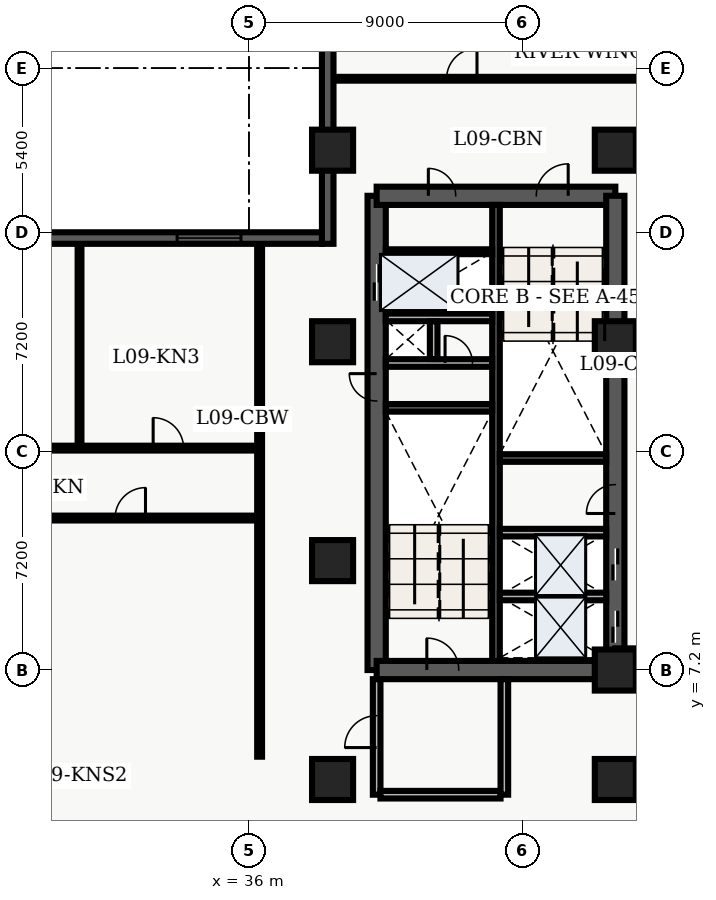
"""IFC4 building model, lengths in metres.
Left out: names, types, materials, properties, quantities, classifications, styles, units other than length and angle.
Written with IfcOpenShell. Run it as: python <this file> out.ifc"""

import sys

from ifc_helpers import new_model, entity, si_unit, converted_unit, direction, frame, origin_with_axes, origin_2d_with_axis, place, context, subcontext, project, spatial, polyline, rectangle, outline, extrude, element, fill, save


model = new_model("IFC4")
c1 = context("Model", 3, precision=1e-05, world=origin_with_axes(), true_north=direction((0.0, 1.0)))
c2 = subcontext(c1, "Body", "Model", "MODEL_VIEW")
j1 = project(units=[si_unit("LENGTHUNIT", "METRE"), converted_unit("PLANEANGLEUNIT", "DEGREE", entity("IfcPlaneAngleMeasure", 0.017), si_unit("PLANEANGLEUNIT", "RADIAN"), dimensions=[0, 0, 0, 0, 0, 0, 0])], contexts=[c1])
p1 = place(None, origin_with_axes())
s1 = spatial("IfcSite", under=j1, at=p1, CompositionType="ELEMENT")
p2 = place(p1, origin_with_axes())
s2 = spatial("IfcBuilding", under=s1, at=p2, CompositionType="ELEMENT")
p3 = place(p2, frame((0.0, 0.0, 40.5), z_axis=(0.0, 0.0, 1.0), x_axis=(1.0, 0.0, 0.0)))
s3 = spatial("IfcBuildingStorey", under=s2, at=p3, CompositionType="ELEMENT", Elevation=40.5)
p4 = place(p3, frame((40.2, 7.2, 0.0), z_axis=(0.0, 0.0, 1.0), x_axis=(0.0, 1.0, 0.0)))
e1 = element("IfcWall", 1, at=p4, inside=s3, PredefinedType="SHEAR", context=c2, shape_type="SweptSolid", body=[
    extrude(outline(polyline([(0.0, -0.3), (15.6, -0.3), (15.6, 0.3), (0.0, 0.3), (0.0, -0.3)])), origin_with_axes(), (0.0, 0.0, 1.0), 3.66),
])
p5 = place(p4, frame((12.75, 0.0, 0.0), z_axis=(0.0, 0.0, 1.0), x_axis=(1.0, 0.0, 0.0)))
e2 = element("IfcOpeningElement", 2, at=p5, cuts=e1, PredefinedType="OPENING", context=c2, shape_type="SweptSolid", body=[
    extrude(rectangle(XDim=1.2, YDim=0.62, at=origin_2d_with_axis()), origin_with_axes(), (0.0, 0.0, 1.0), 2.15),
])
p6 = place(p4, frame((9.3, 0.0, 0.0), z_axis=(0.0, 0.0, 1.0), x_axis=(1.0, 0.0, 0.0)))
e3 = element("IfcOpeningElement", 3, at=p6, cuts=e1, PredefinedType="OPENING", context=c2, shape_type="SweptSolid", body=[
    extrude(rectangle(XDim=0.9, YDim=0.62, at=origin_2d_with_axis()), origin_with_axes(), (0.0, 0.0, 1.0), 2.15),
])
p7 = place(p3, frame((40.2, 7.2, 0.0), z_axis=(0.0, 0.0, 1.0), x_axis=(1.0, 0.0, 0.0)))
e4 = element("IfcWall", 4, at=p7, inside=s3, PredefinedType="SHEAR", context=c2, shape_type="SweptSolid", body=[
    extrude(outline(polyline([(0.0, -0.3), (7.85, -0.3), (7.85, 0.3), (0.0, 0.3), (0.0, -0.3)])), origin_with_axes(), (0.0, 0.0, 1.0), 3.66),
])
p8 = place(p7, frame((2.175, 0.0, 0.0), z_axis=(0.0, 0.0, 1.0), x_axis=(1.0, 0.0, 0.0)))
e5 = element("IfcOpeningElement", 5, at=p8, cuts=e4, PredefinedType="OPENING", context=c2, shape_type="SweptSolid", body=[
    extrude(rectangle(XDim=1.05, YDim=0.62, at=origin_2d_with_axis()), origin_with_axes(), (0.0, 0.0, 1.0), 2.15),
])
p9 = place(p3, frame((40.2, 22.8, 0.0), z_axis=(0.0, 0.0, 1.0), x_axis=(1.0, 0.0, 0.0)))
e6 = element("IfcWall", 6, at=p9, inside=s3, PredefinedType="SHEAR", context=c2, shape_type="SweptSolid", body=[
    extrude(outline(polyline([(0.0, -0.3), (7.85, -0.3), (7.85, 0.3), (0.0, 0.3), (0.0, -0.3)])), origin_with_axes(), (0.0, 0.0, 1.0), 3.66),
])
p10 = place(p9, frame((5.775, 0.0, 0.0), z_axis=(0.0, 0.0, 1.0), x_axis=(1.0, 0.0, 0.0)))
e7 = element("IfcOpeningElement", 7, at=p10, cuts=e6, PredefinedType="OPENING", context=c2, shape_type="SweptSolid", body=[
    extrude(rectangle(XDim=1.05, YDim=0.62, at=origin_2d_with_axis()), origin_with_axes(), (0.0, 0.0, 1.0), 2.15),
])
p11 = place(p9, frame((2.15, 0.0, 0.0), z_axis=(0.0, 0.0, 1.0), x_axis=(1.0, 0.0, 0.0)))
e8 = element("IfcOpeningElement", 8, at=p11, cuts=e6, PredefinedType="OPENING", context=c2, shape_type="SweptSolid", body=[
    extrude(rectangle(XDim=0.9, YDim=0.62, at=origin_2d_with_axis()), origin_with_axes(), (0.0, 0.0, 1.0), 2.15),
])
p12 = place(p3, frame((48.05, 7.2, 0.0), z_axis=(0.0, 0.0, 1.0), x_axis=(0.0, 1.0, 0.0)))
e9 = element("IfcWall", 9, at=p12, inside=s3, PredefinedType="SHEAR", context=c2, shape_type="SweptSolid", body=[
    extrude(outline(polyline([(0.0, -0.3), (15.6, -0.3), (15.6, 0.3), (0.0, 0.3), (0.0, -0.3)])), origin_with_axes(), (0.0, 0.0, 1.0), 3.66),
])
p13 = place(p12, frame((1.425, 0.0, 0.0), z_axis=(0.0, 0.0, 1.0), x_axis=(1.0, 0.0, 0.0)))
e10 = element("IfcOpeningElement", 10, at=p13, cuts=e9, PredefinedType="OPENING", context=c2, shape_type="SweptSolid", body=[
    extrude(rectangle(XDim=1.05, YDim=0.62, at=origin_2d_with_axis()), origin_with_axes(), (0.0, 0.0, 1.0), 2.15),
])
p14 = place(p12, frame((3.475, 0.0, 0.0), z_axis=(0.0, 0.0, 1.0), x_axis=(1.0, 0.0, 0.0)))
e11 = element("IfcOpeningElement", 11, at=p14, cuts=e9, PredefinedType="OPENING", context=c2, shape_type="SweptSolid", body=[
    extrude(rectangle(XDim=1.05, YDim=0.62, at=origin_2d_with_axis()), origin_with_axes(), (0.0, 0.0, 1.0), 2.15),
])
p15 = place(p12, frame((5.625, 0.0, 0.0), z_axis=(0.0, 0.0, 1.0), x_axis=(1.0, 0.0, 0.0)))
e12 = element("IfcOpeningElement", 12, at=p15, cuts=e9, PredefinedType="OPENING", context=c2, shape_type="SweptSolid", body=[
    extrude(rectangle(XDim=0.95, YDim=0.62, at=origin_2d_with_axis()), origin_with_axes(), (0.0, 0.0, 1.0), 2.15),
])
p16 = place(p3, frame((44.125, 7.5, 0.0), z_axis=(0.0, 0.0, 1.0), x_axis=(0.0, 1.0, 0.0)))
e13 = element("IfcWall", 13, at=p16, inside=s3, PredefinedType="SHEAR", context=c2, shape_type="SweptSolid", body=[
    extrude(outline(polyline([(0.0, -0.125), (15.0, -0.125), (15.0, 0.125), (0.0, 0.125), (0.0, -0.125)])), origin_with_axes(), (0.0, 0.0, 1.0), 3.66),
])
for number, where, z_axis, x_axis in (
    (14, (40.5, 15.825, 0.0), (0.0, 0.0, 1.0), (1.0, 0.0, 0.0)),
    (15, (44.25, 14.175, 0.0), (0.0, 0.0, 1.0), (1.0, 0.0, 0.0)),
):
    element("IfcWall", number, at=place(p3, frame(where, z_axis=z_axis, x_axis=x_axis)), inside=s3, PredefinedType="SHEAR", context=c2, shape_type="SweptSolid", body=[
        extrude(outline(polyline([(0.0, -0.125), (3.5, -0.125), (3.5, 0.125), (0.0, 0.125), (0.0, -0.125)])), origin_with_axes(), (0.0, 0.0, 1.0), 3.66),
    ])
p17 = place(p3, frame((40.5, 17.3, 0.0), z_axis=(0.0, 0.0, 1.0), x_axis=(1.0, 0.0, 0.0)))
e16 = element("IfcWall", 16, at=p17, inside=s3, PredefinedType="SOLIDWALL", context=c2, shape_type="SweptSolid", body=[
    extrude(outline(polyline([(0.0, -0.125), (3.5, -0.125), (3.5, 0.125), (0.0, 0.125), (0.0, -0.125)])), origin_with_axes(), (0.0, 0.0, 1.0), 2.7),
])
p18 = place(p17, frame((2.4, 0.0, 0.0), z_axis=(0.0, 0.0, 1.0), x_axis=(1.0, 0.0, 0.0)))
e17 = element("IfcOpeningElement", 17, at=p18, cuts=e16, PredefinedType="OPENING", context=c2, shape_type="SweptSolid", body=[
    extrude(rectangle(XDim=0.9, YDim=0.27, at=origin_2d_with_axis()), origin_with_axes(), (0.0, 0.0, 1.0), 2.15),
])
p19 = place(p3, frame((40.5, 18.8, 0.0), z_axis=(0.0, 0.0, 1.0), x_axis=(1.0, 0.0, 0.0)))
e18 = element("IfcWall", 18, at=p19, inside=s3, PredefinedType="SOLIDWALL", context=c2, shape_type="SweptSolid", body=[
    extrude(outline(polyline([(0.0, -0.125), (3.5, -0.125), (3.5, 0.125), (0.0, 0.125), (0.0, -0.125)])), origin_with_axes(), (0.0, 0.0, 1.0), 2.7),
])
p20 = place(p3, frame((42.075, 17.43, 0.0), z_axis=(0.0, 0.0, 1.0), x_axis=(0.0, 1.0, 0.0)))
e19 = element("IfcWall", 19, at=p20, inside=s3, PredefinedType="SOLIDWALL", context=c2, shape_type="SweptSolid", body=[
    extrude(outline(polyline([(0.0, -0.125), (1.24, -0.125), (1.24, 0.125), (0.0, 0.125), (0.0, -0.125)])), origin_with_axes(), (0.0, 0.0, 1.0), 2.7),
])
p21 = place(p3, frame((40.2, 3.1, 0.0), z_axis=(0.0, 0.0, 1.0), x_axis=(0.0, 1.0, 0.0)))
e20 = element("IfcWall", 20, at=p21, inside=s3, PredefinedType="SOLIDWALL", context=c2, shape_type="SweptSolid", body=[
    extrude(outline(polyline([(0.0, -0.125), (3.8, -0.125), (3.8, 0.125), (0.0, 0.125), (0.0, -0.125)])), origin_with_axes(), (0.0, 0.0, 1.0), 2.7),
])
p22 = place(p21, frame((2.075, 0.0, 0.0), z_axis=(0.0, 0.0, 1.0), x_axis=(1.0, 0.0, 0.0)))
e21 = element("IfcOpeningElement", 21, at=p22, cuts=e20, PredefinedType="OPENING", context=c2, shape_type="SweptSolid", body=[
    extrude(rectangle(XDim=1.05, YDim=0.27, at=origin_2d_with_axis()), origin_with_axes(), (0.0, 0.0, 1.0), 2.15),
])
p23 = place(p3, frame((40.325, 3.1, 0.0), z_axis=(0.0, 0.0, 1.0), x_axis=(1.0, 0.0, 0.0)))
e22 = element("IfcWall", 22, at=p23, inside=s3, PredefinedType="SOLIDWALL", context=c2, shape_type="SweptSolid", body=[
    extrude(outline(polyline([(0.0, -0.125), (3.95, -0.125), (3.95, 0.125), (0.0, 0.125), (0.0, -0.125)])), origin_with_axes(), (0.0, 0.0, 1.0), 2.7),
])
p24 = place(p3, frame((44.4, 3.1, 0.0), z_axis=(0.0, 0.0, 1.0), x_axis=(0.0, 1.0, 0.0)))
e23 = element("IfcWall", 23, at=p24, inside=s3, PredefinedType="SOLIDWALL", context=c2, shape_type="SweptSolid", body=[
    extrude(outline(polyline([(0.0, -0.125), (3.8, -0.125), (3.8, 0.125), (0.0, 0.125), (0.0, -0.125)])), origin_with_axes(), (0.0, 0.0, 1.0), 2.7),
])
for number, where, z_axis, x_axis in (
    (24, (38.75, 3.6, 0.0), (0.0, 0.0, 1.0), (1.0, 0.0, 0.0)),
    (25, (38.75, 10.8, 0.0), (0.0, 0.0, 1.0), (1.0, 0.0, 0.0)),
    (26, (38.75, 18.0, 0.0), (0.0, 0.0, 1.0), (1.0, 0.0, 0.0)),
    (27, (38.75, 24.3, 0.0), (0.0, 0.0, 1.0), (1.0, 0.0, 0.0)),
    (28, (48.05, 3.6, 0.0), (0.0, 0.0, 1.0), (1.0, 0.0, 0.0)),
    (29, (48.05, 7.2, 0.0), (0.0, 0.0, 1.0), (1.0, 0.0, 0.0)),
    (30, (48.05, 18.0, 0.0), (0.0, 0.0, 1.0), (1.0, 0.0, 0.0)),
    (31, (48.05, 24.3, 0.0), (0.0, 0.0, 1.0), (1.0, 0.0, 0.0)),
):
    element("IfcColumn", number, at=place(p3, frame(where, z_axis=z_axis, x_axis=x_axis)), inside=s3, PredefinedType="COLUMN", context=c2, shape_type="SweptSolid", body=[
        extrude(rectangle(XDim=1.35, YDim=1.35, at=origin_2d_with_axis()), origin_with_axes(), (0.0, 0.0, 1.0), 3.9),
    ])
p25 = place(p3, frame((40.5, 20.96, 0.0), z_axis=(0.0, 0.0, 1.0), x_axis=(1.0, 0.0, 0.0)))
e32 = element("IfcWall", 32, at=p25, inside=s3, PredefinedType="PARTITIONING", context=c2, shape_type="SweptSolid", body=[
    extrude(outline(polyline([(0.0, -0.08), (3.5, -0.08), (3.5, 0.08), (0.0, 0.08), (0.0, -0.08)])), origin_with_axes(), (0.0, 0.0, 1.0), 2.7),
])
for number, where, z_axis, x_axis in (
    (33, (44.25, 9.62, 0.0), (0.0, 0.0, 1.0), (1.0, 0.0, 0.0)),
    (34, (44.25, 11.72, 0.0), (0.0, 0.0, 1.0), (1.0, 0.0, 0.0)),
):
    element("IfcWall", number, at=place(p3, frame(where, z_axis=z_axis, x_axis=x_axis)), inside=s3, PredefinedType="SOLIDWALL", context=c2, shape_type="SweptSolid", body=[
        extrude(outline(polyline([(0.0, -0.125), (3.5, -0.125), (3.5, 0.125), (0.0, 0.125), (0.0, -0.125)])), origin_with_axes(), (0.0, 0.0, 1.0), 2.7),
    ])
p26 = place(p3, frame((21.15, 12.2, 0.0), z_axis=(0.0, 0.0, 1.0), x_axis=(1.0, 0.0, 0.0)))
e35 = element("IfcWall", 35, at=p26, inside=s3, PredefinedType="PARTITIONING", context=c2, shape_type="SweptSolid", body=[
    extrude(outline(polyline([(0.0, -0.08), (15.2, -0.08), (15.2, 0.08), (0.0, 0.08), (0.0, -0.08)])), origin_with_axes(), (0.0, 0.0, 1.0), 2.7),
])
p27 = place(p26, frame((3.477, 0.0, 0.0), z_axis=(0.0, 0.0, 1.0), x_axis=(1.0, 0.0, 0.0)))
e36 = element("IfcOpeningElement", 36, at=p27, cuts=e35, PredefinedType="OPENING", context=c2, shape_type="SweptSolid", body=[
    extrude(rectangle(XDim=1.0, YDim=0.18, at=origin_2d_with_axis()), origin_with_axes(), (0.0, 0.0, 1.0), 2.15),
])
p28 = place(p26, frame((10.947, 0.0, 0.0), z_axis=(0.0, 0.0, 1.0), x_axis=(1.0, 0.0, 0.0)))
e37 = element("IfcOpeningElement", 37, at=p28, cuts=e35, PredefinedType="OPENING", context=c2, shape_type="SweptSolid", body=[
    extrude(rectangle(XDim=1.0, YDim=0.18, at=origin_2d_with_axis()), origin_with_axes(), (0.0, 0.0, 1.0), 2.15),
])
p29 = place(p3, frame((21.15, 14.5, 0.0), z_axis=(0.0, 0.0, 1.0), x_axis=(1.0, 0.0, 0.0)))
e38 = element("IfcWall", 38, at=p29, inside=s3, PredefinedType="PARTITIONING", context=c2, shape_type="SweptSolid", body=[
    extrude(outline(polyline([(0.0, -0.08), (15.2, -0.08), (15.2, 0.08), (0.0, 0.08), (0.0, -0.08)])), origin_with_axes(), (0.0, 0.0, 1.0), 2.7),
])
p30 = place(p29, frame((2.303, 0.0, 0.0), z_axis=(0.0, 0.0, 1.0), x_axis=(1.0, 0.0, 0.0)))
e39 = element("IfcOpeningElement", 39, at=p30, cuts=e38, PredefinedType="OPENING", context=c2, shape_type="SweptSolid", body=[
    extrude(rectangle(XDim=1.0, YDim=0.18, at=origin_2d_with_axis()), origin_with_axes(), (0.0, 0.0, 1.0), 2.15),
])
p31 = place(p29, frame((6.851, 0.0, 0.0), z_axis=(0.0, 0.0, 1.0), x_axis=(1.0, 0.0, 0.0)))
e40 = element("IfcOpeningElement", 40, at=p31, cuts=e38, PredefinedType="OPENING", context=c2, shape_type="SweptSolid", body=[
    extrude(rectangle(XDim=1.2, YDim=0.18, at=origin_2d_with_axis()), origin_with_axes(), (0.0, 0.0, 1.0), 2.2),
])
p32 = place(p29, frame((12.198, 0.0, 0.0), z_axis=(0.0, 0.0, 1.0), x_axis=(1.0, 0.0, 0.0)))
e41 = element("IfcOpeningElement", 41, at=p32, cuts=e38, PredefinedType="OPENING", context=c2, shape_type="SweptSolid", body=[
    extrude(rectangle(XDim=1.0, YDim=0.18, at=origin_2d_with_axis()), origin_with_axes(), (0.0, 0.0, 1.0), 2.15),
])
p33 = place(p3, frame((36.35, 4.35, 0.0), z_axis=(0.0, 0.0, 1.0), x_axis=(0.0, 1.0, 0.0)))
e42 = element("IfcWall", 42, at=p33, inside=s3, PredefinedType="PARTITIONING", context=c2, shape_type="SweptSolid", body=[
    extrude(outline(polyline([(0.0, -0.08), (16.95, -0.08), (16.95, 0.08), (0.0, 0.08), (0.0, -0.08)])), origin_with_axes(), (0.0, 0.0, 1.0), 2.7),
])
p34 = place(p3, frame((30.427, 14.62, 0.0), z_axis=(0.0, 0.0, 1.0), x_axis=(0.0, 1.0, 0.0)))
e43 = element("IfcWall", 43, at=p34, inside=s3, PredefinedType="PARTITIONING", context=c2, shape_type="SweptSolid", body=[
    extrude(outline(polyline([(0.0, -0.062), (6.605, -0.062), (6.605, 0.062), (0.0, 0.062), (0.0, -0.062)])), origin_with_axes(), (0.0, 0.0, 1.0), 2.7),
])
p35 = place(p3, frame((59.64, 7.85, 0.0), z_axis=(0.0, 0.0, 1.0), x_axis=(-1.0, 0.0, 0.0)))
e44 = element("IfcWall", 44, at=p35, inside=s3, PredefinedType="PARTITIONING", context=c2, shape_type="SweptSolid", body=[
    extrude(outline(polyline([(0.0, -0.062), (11.59, -0.062), (11.59, 0.062), (0.0, 0.062), (0.0, -0.062)])), origin_with_axes(), (0.0, 0.0, 1.0), 2.7),
])
p36 = place(p35, frame((10.29, 0.0, 0.0), z_axis=(0.0, 0.0, 1.0), x_axis=(1.0, 0.0, 0.0)))
e45 = element("IfcOpeningElement", 45, at=p36, cuts=e44, PredefinedType="OPENING", context=c2, shape_type="SweptSolid", body=[
    extrude(rectangle(XDim=1.0, YDim=0.145, at=origin_2d_with_axis()), origin_with_axes(), (0.0, 0.0, 1.0), 2.15),
])
p37 = place(p3, frame((38.76, 26.65, 0.0), z_axis=(0.0, 0.0, 1.0), x_axis=(1.0, 0.0, 0.0)))
e46 = element("IfcWall", 46, at=p37, inside=s3, PredefinedType="PARTITIONING", context=c2, shape_type="SweptSolid", body=[
    extrude(outline(polyline([(0.0, -0.062), (20.88, -0.062), (20.88, 0.062), (0.0, 0.062), (0.0, -0.062)])), origin_with_axes(), (0.0, 0.0, 1.0), 2.7),
])
p38 = place(p37, frame((4.24, 0.0, 0.0), z_axis=(0.0, 0.0, 1.0), x_axis=(1.0, 0.0, 0.0)))
e47 = element("IfcOpeningElement", 47, at=p38, cuts=e46, PredefinedType="OPENING", context=c2, shape_type="SweptSolid", body=[
    extrude(rectangle(XDim=1.0, YDim=0.145, at=origin_2d_with_axis()), origin_with_axes(), (0.0, 0.0, 1.0), 2.15),
])
p39 = place(p3, frame((38.59, 21.22, 0.0), z_axis=(0.0, 0.0, 1.0), x_axis=(0.0, 1.0, 0.0)))
e48 = element("IfcWall", 48, at=p39, inside=s3, PredefinedType="SOLIDWALL", context=c2, shape_type="SweptSolid", body=[
    extrude(outline(polyline([(0.0, -0.19), (7.58, -0.19), (7.58, 0.19), (0.0, 0.19), (0.0, -0.19)])), origin_with_axes(), (0.0, 0.0, 1.0), 3.66),
])
p40 = place(p3, frame((21.22, 21.41, 0.0), z_axis=(0.0, 0.0, 1.0), x_axis=(1.0, 0.0, 0.0)))
e49 = element("IfcWall", 49, at=p40, inside=s3, PredefinedType="SOLIDWALL", context=c2, shape_type="SweptSolid", body=[
    extrude(outline(polyline([(0.0, -0.19), (17.18, -0.19), (17.18, 0.19), (0.0, 0.19), (0.0, -0.19)])), origin_with_axes(), (0.0, 0.0, 1.0), 3.66),
])
p41 = place(p40, frame((2.413, 0.0, 0.45), z_axis=(0.0, 0.0, 1.0), x_axis=(1.0, 0.0, 0.0)))
e50 = element("IfcOpeningElement", 50, at=p41, cuts=e49, PredefinedType="OPENING", context=c2, shape_type="SweptSolid", body=[
    extrude(rectangle(XDim=2.1, YDim=0.4, at=origin_2d_with_axis()), origin_with_axes(), (0.0, 0.0, 1.0), 2.2),
])
p42 = place(p40, frame((13.467, 0.0, 0.45), z_axis=(0.0, 0.0, 1.0), x_axis=(1.0, 0.0, 0.0)))
e51 = element("IfcOpeningElement", 51, at=p42, cuts=e49, PredefinedType="OPENING", context=c2, shape_type="SweptSolid", body=[
    extrude(rectangle(XDim=2.1, YDim=0.4, at=origin_2d_with_axis()), origin_with_axes(), (0.0, 0.0, 1.0), 2.2),
])
p43 = place(p12, frame((1.425, 0.0, 0.0), z_axis=(0.0, 0.0, 1.0), x_axis=(1.0, 0.0, 0.0)))
e52 = element("IfcDoor", 52, at=p43, inside=s3, OperationType="SLIDING_TO_LEFT", PredefinedType="DOOR", context=c2, shape_type="SweptSolid", body=[
    extrude(rectangle(XDim=1.05, YDim=0.09, at=origin_2d_with_axis()), origin_with_axes(), (0.0, 0.0, 1.0), 2.15),
])
fill(e10, e52)
p44 = place(p12, frame((3.475, 0.0, 0.0), z_axis=(0.0, 0.0, 1.0), x_axis=(1.0, 0.0, 0.0)))
e53 = element("IfcDoor", 53, at=p44, inside=s3, OperationType="SLIDING_TO_RIGHT", PredefinedType="DOOR", context=c2, shape_type="SweptSolid", body=[
    extrude(rectangle(XDim=1.05, YDim=0.09, at=origin_2d_with_axis()), origin_with_axes(), (0.0, 0.0, 1.0), 2.15),
])
fill(e11, e53)
p45 = place(p4, frame((12.75, 0.0, 0.0), z_axis=(0.0, 0.0, 1.0), x_axis=(1.0, 0.0, 0.0)))
e54 = element("IfcDoor", 54, at=p45, inside=s3, OperationType="DOUBLE_DOOR_SLIDING", PredefinedType="DOOR", context=c2, shape_type="SweptSolid", body=[
    extrude(rectangle(XDim=1.2, YDim=0.09, at=origin_2d_with_axis()), origin_with_axes(), (0.0, 0.0, 1.0), 2.15),
])
fill(e2, e54)
p46 = place(p4, frame((9.3, 0.0, 0.0), z_axis=(0.0, 0.0, 1.0), x_axis=(1.0, 0.0, 0.0)))
e55 = element("IfcDoor", 55, at=p46, inside=s3, OperationType="SINGLE_SWING_RIGHT", PredefinedType="DOOR", context=c2, shape_type="SweptSolid", body=[
    extrude(rectangle(XDim=0.9, YDim=0.09, at=origin_2d_with_axis()), origin_with_axes(), (0.0, 0.0, 1.0), 2.15),
])
fill(e3, e55)
p47 = place(p17, frame((2.4, 0.0, 0.0), z_axis=(0.0, 0.0, 1.0), x_axis=(1.0, 0.0, 0.0)))
e56 = element("IfcDoor", 56, at=p47, inside=s3, OperationType="SINGLE_SWING_LEFT", PredefinedType="DOOR", context=c2, shape_type="SweptSolid", body=[
    extrude(rectangle(XDim=0.9, YDim=0.09, at=origin_2d_with_axis()), origin_with_axes(), (0.0, 0.0, 1.0), 2.15),
])
fill(e17, e56)
p48 = place(p7, frame((2.175, 0.0, 0.0), z_axis=(0.0, 0.0, 1.0), x_axis=(1.0, 0.0, 0.0)))
e57 = element("IfcDoor", 57, at=p48, inside=s3, OperationType="SINGLE_SWING_LEFT", PredefinedType="DOOR", context=c2, shape_type="SweptSolid", body=[
    extrude(rectangle(XDim=1.05, YDim=0.09, at=origin_2d_with_axis()), origin_with_axes(), (0.0, 0.0, 1.0), 2.15),
])
fill(e5, e57)
p49 = place(p9, frame((5.775, 0.0, 0.0), z_axis=(0.0, 0.0, 1.0), x_axis=(1.0, 0.0, 0.0)))
e58 = element("IfcDoor", 58, at=p49, inside=s3, OperationType="SINGLE_SWING_RIGHT", PredefinedType="DOOR", context=c2, shape_type="SweptSolid", body=[
    extrude(rectangle(XDim=1.05, YDim=0.09, at=origin_2d_with_axis()), origin_with_axes(), (0.0, 0.0, 1.0), 2.15),
])
fill(e7, e58)
p50 = place(p21, frame((2.075, 0.0, 0.0), z_axis=(0.0, 0.0, 1.0), x_axis=(1.0, 0.0, 0.0)))
e59 = element("IfcDoor", 59, at=p50, inside=s3, OperationType="SINGLE_SWING_LEFT", PredefinedType="DOOR", context=c2, shape_type="SweptSolid", body=[
    extrude(rectangle(XDim=1.05, YDim=0.09, at=origin_2d_with_axis()), origin_with_axes(), (0.0, 0.0, 1.0), 2.15),
])
fill(e21, e59)
p51 = place(p9, frame((2.15, 0.0, 0.0), z_axis=(0.0, 0.0, 1.0), x_axis=(1.0, 0.0, 0.0)))
e60 = element("IfcDoor", 60, at=p51, inside=s3, OperationType="SINGLE_SWING_LEFT", PredefinedType="DOOR", context=c2, shape_type="SweptSolid", body=[
    extrude(rectangle(XDim=0.9, YDim=0.09, at=origin_2d_with_axis()), origin_with_axes(), (0.0, 0.0, 1.0), 2.15),
])
fill(e8, e60)
p52 = place(p12, frame((5.625, 0.0, 0.0), z_axis=(0.0, 0.0, 1.0), x_axis=(1.0, 0.0, 0.0)))
e61 = element("IfcDoor", 61, at=p52, inside=s3, OperationType="SINGLE_SWING_LEFT", PredefinedType="DOOR", context=c2, shape_type="SweptSolid", body=[
    extrude(rectangle(XDim=0.95, YDim=0.09, at=origin_2d_with_axis()), origin_with_axes(), (0.0, 0.0, 1.0), 2.15),
])
fill(e12, e61)
p53 = place(p26, frame((10.947, 0.0, 0.0), z_axis=(0.0, 0.0, 1.0), x_axis=(1.0, 0.0, 0.0)))
e62 = element("IfcDoor", 62, at=p53, inside=s3, OperationType="SINGLE_SWING_RIGHT", PredefinedType="DOOR", context=c2, shape_type="SweptSolid", body=[
    extrude(rectangle(XDim=1.0, YDim=0.09, at=origin_2d_with_axis()), origin_with_axes(), (0.0, 0.0, 1.0), 2.15),
])
fill(e37, e62)
p54 = place(p29, frame((12.198, 0.0, 0.0), z_axis=(0.0, 0.0, 1.0), x_axis=(1.0, 0.0, 0.0)))
e63 = element("IfcDoor", 63, at=p54, inside=s3, OperationType="SINGLE_SWING_LEFT", PredefinedType="DOOR", context=c2, shape_type="SweptSolid", body=[
    extrude(rectangle(XDim=1.0, YDim=0.09, at=origin_2d_with_axis()), origin_with_axes(), (0.0, 0.0, 1.0), 2.15),
])
fill(e41, e63)
p55 = place(p37, frame((4.24, 0.0, 0.0), z_axis=(0.0, 0.0, 1.0), x_axis=(1.0, 0.0, 0.0)))
e64 = element("IfcDoor", 64, at=p55, inside=s3, OperationType="SINGLE_SWING_RIGHT", PredefinedType="DOOR", context=c2, shape_type="SweptSolid", body=[
    extrude(rectangle(XDim=1.0, YDim=0.075, at=origin_2d_with_axis()), origin_with_axes(), (0.0, 0.0, 1.0), 2.15),
])
fill(e47, e64)
p56 = place(p40, frame((13.467, 0.0, 0.45), z_axis=(0.0, 0.0, 1.0), x_axis=(1.0, 0.0, 0.0)))
e65 = element("IfcWindow", 65, at=p56, inside=s3, PredefinedType="WINDOW", context=c2, shape_type="SweptSolid", body=[
    extrude(rectangle(XDim=2.1, YDim=0.09, at=origin_2d_with_axis()), origin_with_axes(), (0.0, 0.0, 1.0), 2.2),
])
fill(e51, e65)
save(model, sys.argv[1])
